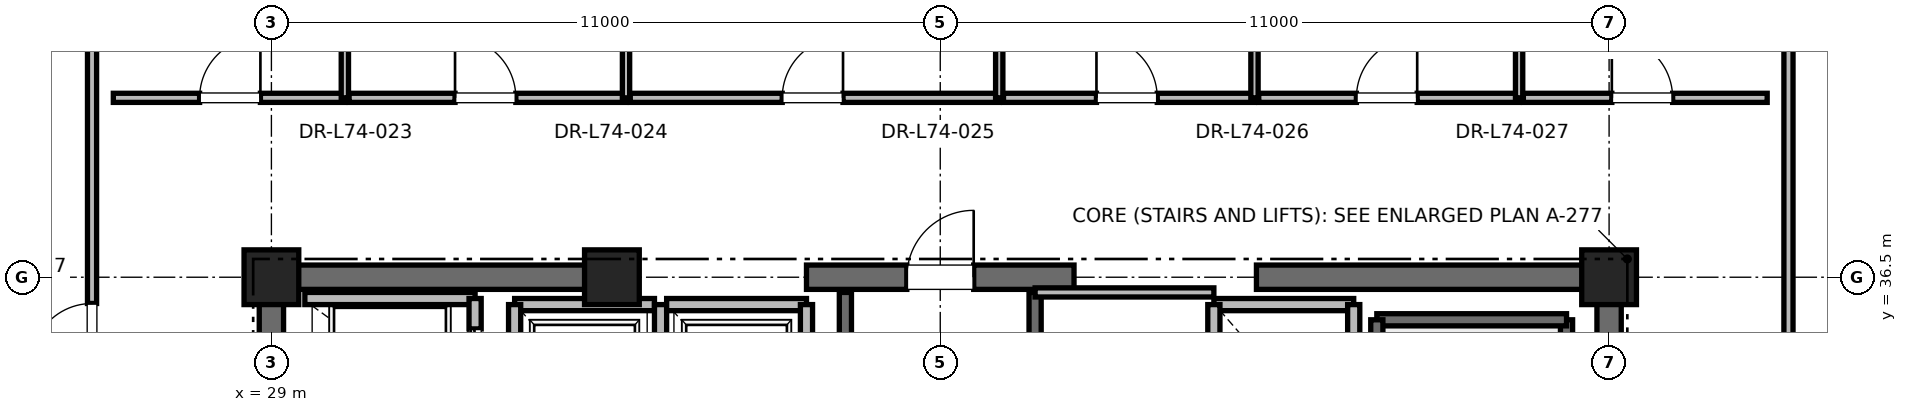
"""IFC4 building model, lengths in metres.
Left out: names, types, materials, properties, quantities, classifications, styles, units other than length and angle.
Written with IfcOpenShell. Run it as: python <this file> out.ifc"""

import sys

from ifc_helpers import new_model, si_unit, direction, frame, frame_2d, origin, origin_2d, place, context, subcontext, project, spatial, rectangle, extrude, element, fill, save


model = new_model("IFC4")
c1 = context("Model", 3, precision=1e-05, world=origin(), true_north=direction((0.0, 1.0)))
c2 = subcontext(c1, "Body", "Model", "MODEL_VIEW")
j1 = project(units=[si_unit("LENGTHUNIT", "METRE"), si_unit("PLANEANGLEUNIT", "RADIAN")], contexts=[c1])
p1 = place(None, origin())
s1 = spatial("IfcSite", under=j1, at=p1, CompositionType="ELEMENT")
p2 = place(p1, origin())
s2 = spatial("IfcBuilding", under=s1, at=p2, CompositionType="ELEMENT")
p3 = place(p2, frame((0.0, 0.0, 318.8)))
s3 = spatial("IfcBuildingStorey", under=s2, at=p3, CompositionType="ELEMENT", Elevation=318.8)
for number, where, z_axis, x_axis in (
    (1, (29.0, 36.5, 0.0), (0.0, 0.0, 1.0), (1.0, 0.0, 0.0)),
    (2, (51.0, 36.5, 0.0), (0.0, 0.0, 1.0), (1.0, 0.0, 0.0)),
    (3, (34.6, 36.5, 0.0), (0.0, 0.0, 1.0), (1.0, 0.0, 0.0)),
):
    element("IfcColumn", number, at=place(p3, frame(where, z_axis=z_axis, x_axis=x_axis)), inside=s3, PredefinedType="PILASTER", context=c2, shape_type="SweptSolid", body=[
        extrude(rectangle(XDim=0.9, YDim=0.9, at=origin_2d()), origin(), (0.0, 0.0, 1.0), 4.0),
    ])
p4 = place(p3, frame((29.0, 36.5, 0.0), z_axis=(0.0, 0.0, 1.0), x_axis=(1.0, 0.0, 0.0)))
e4 = element("IfcWall", 4, at=p4, inside=s3, PredefinedType="SHEAR", context=c2, shape_type="SweptSolid", body=[
    extrude(rectangle(XDim=5.8, YDim=0.4, at=frame_2d((2.9, 0.0))), origin(), (0.0, 0.0, 1.0), 3.785),
])
p5 = place(p3, frame((37.8, 36.5, 0.0), z_axis=(0.0, 0.0, 1.0), x_axis=(1.0, 0.0, 0.0)))
e5 = element("IfcWall", 5, at=p5, inside=s3, PredefinedType="SHEAR", context=c2, shape_type="SweptSolid", body=[
    extrude(rectangle(XDim=4.4, YDim=0.4, at=frame_2d((2.2, 0.0))), origin(), (0.0, 0.0, 1.0), 3.785),
])
p6 = place(p5, frame((1.65, 0.0, 0.0)))
e6 = element("IfcOpeningElement", 6, at=p6, cuts=e5, PredefinedType="OPENING", context=c2, shape_type="SweptSolid", body=[
    extrude(rectangle(XDim=1.1, YDim=2.15, at=frame_2d((0.55, 1.075))), frame((0.0, 0.2, 0.0), z_axis=(0.0, -1.0, 0.0), x_axis=(1.0, 0.0, 0.0)), (0.0, 0.0, 1.0), 0.4),
])
for number, where, z_axis, x_axis in (
    (7, (45.2, 36.5, 0.0), (0.0, 0.0, 1.0), (1.0, 0.0, 0.0)),
    (8, (29.0, 30.7, 0.0), (0.0, 0.0, 1.0), (0.0, 1.0, 0.0)),
):
    element("IfcWall", number, at=place(p3, frame(where, z_axis=z_axis, x_axis=x_axis)), inside=s3, PredefinedType="SHEAR", context=c2, shape_type="SweptSolid", body=[
        extrude(rectangle(XDim=5.8, YDim=0.4, at=frame_2d((2.9, 0.0))), origin(), (0.0, 0.0, 1.0), 3.785),
    ])
p7 = place(p3, frame((51.0, 27.7, 0.0), z_axis=(0.0, 0.0, 1.0), x_axis=(0.0, 1.0, 0.0)))
e9 = element("IfcWall", 9, at=p7, inside=s3, PredefinedType="SHEAR", context=c2, shape_type="SweptSolid", body=[
    extrude(rectangle(XDim=8.8, YDim=0.4, at=frame_2d((4.4, 0.0))), origin(), (0.0, 0.0, 1.0), 3.785),
])
p8 = place(p3, frame((50.3, 27.65, 0.0), z_axis=(0.0, 0.0, 1.0), x_axis=(0.0, 1.0, 0.0)))
e10 = element("IfcWall", 10, at=p8, inside=s3, PredefinedType="SOLIDWALL", context=c2, shape_type="SweptSolid", body=[
    extrude(rectangle(XDim=8.15, YDim=0.2, at=frame_2d((4.075, 0.0))), origin(), (0.0, 0.0, 1.0), 3.785),
])
p9 = place(p3, frame((47.18, 35.8, 0.0), z_axis=(0.0, 0.0, 1.0), x_axis=(1.0, 0.0, 0.0)))
e11 = element("IfcWall", 11, at=p9, inside=s3, PredefinedType="SOLIDWALL", context=c2, shape_type="SweptSolid", body=[
    extrude(rectangle(XDim=3.12, YDim=0.2, at=frame_2d((1.56, 0.0))), origin(), (0.0, 0.0, 1.0), 3.785),
])
p10 = place(p3, frame((47.18, 27.62, 0.0), z_axis=(0.0, 0.0, 1.0), x_axis=(0.0, 1.0, 0.0)))
e12 = element("IfcWall", 12, at=p10, inside=s3, PredefinedType="SOLIDWALL", context=c2, shape_type="SweptSolid", body=[
    extrude(rectangle(XDim=8.18, YDim=0.2, at=frame_2d((4.09, 0.0))), origin(), (0.0, 0.0, 1.0), 3.785),
])
p11 = place(p3, frame((38.44, 27.38, 0.0), z_axis=(0.0, 0.0, 1.0), x_axis=(0.0, 1.0, 0.0)))
e13 = element("IfcWall", 13, at=p11, inside=s3, PredefinedType="SOLIDWALL", context=c2, shape_type="SweptSolid", body=[
    extrude(rectangle(XDim=8.87, YDim=0.2, at=frame_2d((4.435, 0.0))), origin(), (0.0, 0.0, 1.0), 3.785),
])
p12 = place(p3, frame((41.56, 27.68, 0.0), z_axis=(0.0, 0.0, 1.0), x_axis=(0.0, 1.0, 0.0)))
e14 = element("IfcWall", 14, at=p12, inside=s3, PredefinedType="SOLIDWALL", context=c2, shape_type="SweptSolid", body=[
    extrude(rectangle(XDim=8.57, YDim=0.2, at=frame_2d((4.285, 0.0))), origin(), (0.0, 0.0, 1.0), 3.785),
])
p13 = place(p3, frame((32.35, 36.15, 0.0), z_axis=(0.0, 0.0, 1.0), x_axis=(-1.0, 0.0, 0.0)))
e15 = element("IfcWall", 15, at=p13, inside=s3, PredefinedType="SOLIDWALL", context=c2, shape_type="SweptSolid", body=[
    extrude(rectangle(XDim=2.8, YDim=0.2, at=frame_2d((1.4, 0.0))), origin(), (0.0, 0.0, 1.0), 3.22),
])
p14 = place(p3, frame((32.35, 34.05, 0.0), z_axis=(0.0, 0.0, 1.0), x_axis=(0.0, 1.0, 0.0)))
e16 = element("IfcWall", 16, at=p14, inside=s3, PredefinedType="SOLIDWALL", context=c2, shape_type="SweptSolid", body=[
    extrude(rectangle(XDim=2.1, YDim=0.2, at=frame_2d((1.05, 0.0))), origin(), (0.0, 0.0, 1.0), 3.785),
])
p15 = place(p14, frame((0.5, 0.0, 0.0)))
e17 = element("IfcOpeningElement", 17, at=p15, cuts=e16, PredefinedType="OPENING", context=c2, shape_type="SweptSolid", body=[
    extrude(rectangle(XDim=1.1, YDim=2.2, at=frame_2d((0.55, 1.1))), frame((0.0, 0.1, 0.0), z_axis=(0.0, -1.0, 0.0), x_axis=(1.0, 0.0, 0.0)), (0.0, 0.0, 1.0), 0.2),
])
p16 = place(p3, frame((35.3, 36.05, 0.0), z_axis=(0.0, 0.0, 1.0), x_axis=(-1.0, 0.0, 0.0)))
e18 = element("IfcWall", 18, at=p16, inside=s3, PredefinedType="SOLIDWALL", context=c2, shape_type="SweptSolid", body=[
    extrude(rectangle(XDim=2.3, YDim=0.2, at=frame_2d((1.15, 0.0))), origin(), (0.0, 0.0, 1.0), 2.865),
])
p17 = place(p3, frame((33.0, 36.05, 0.0), z_axis=(0.0, 0.0, 1.0), x_axis=(0.0, -1.0, 0.0)))
e19 = element("IfcWall", 19, at=p17, inside=s3, PredefinedType="SOLIDWALL", context=c2, shape_type="SweptSolid", body=[
    extrude(rectangle(XDim=2.6, YDim=0.2, at=frame_2d((1.3, 0.0))), origin(), (0.0, 0.0, 1.0), 3.785),
])
p18 = place(p3, frame((35.4, 33.45, 0.0), z_axis=(0.0, 0.0, 1.0), x_axis=(0.0, 1.0, 0.0)))
e20 = element("IfcWall", 20, at=p18, inside=s3, PredefinedType="SOLIDWALL", context=c2, shape_type="SweptSolid", body=[
    extrude(rectangle(XDim=2.6, YDim=0.2, at=frame_2d((1.3, 0.0))), origin(), (0.0, 0.0, 1.0), 2.865),
])
p19 = place(p3, frame((37.8, 36.05, 0.0), z_axis=(0.0, 0.0, 1.0), x_axis=(-1.0, 0.0, 0.0)))
e21 = element("IfcWall", 21, at=p19, inside=s3, PredefinedType="SOLIDWALL", context=c2, shape_type="SweptSolid", body=[
    extrude(rectangle(XDim=2.3, YDim=0.2, at=frame_2d((1.15, 0.0))), origin(), (0.0, 0.0, 1.0), 2.865),
])
p20 = place(p3, frame((37.8, 33.45, 0.0), z_axis=(0.0, 0.0, 1.0), x_axis=(0.0, 1.0, 0.0)))
e22 = element("IfcWall", 22, at=p20, inside=s3, PredefinedType="SOLIDWALL", context=c2, shape_type="SweptSolid", body=[
    extrude(rectangle(XDim=2.6, YDim=0.2, at=frame_2d((1.3, 0.0))), origin(), (0.0, 0.0, 1.0), 2.865),
])
p21 = place(p3, frame((46.8, 36.05, 0.0), z_axis=(0.0, 0.0, 1.0), x_axis=(-1.0, 0.0, 0.0)))
e23 = element("IfcWall", 23, at=p21, inside=s3, PredefinedType="SOLIDWALL", context=c2, shape_type="SweptSolid", body=[
    extrude(rectangle(XDim=2.3, YDim=0.2, at=frame_2d((1.15, 0.0))), origin(), (0.0, 0.0, 1.0), 2.865),
])
p22 = place(p3, frame((44.5, 36.05, 0.0), z_axis=(0.0, 0.0, 1.0), x_axis=(0.0, -1.0, 0.0)))
e24 = element("IfcWall", 24, at=p22, inside=s3, PredefinedType="SOLIDWALL", context=c2, shape_type="SweptSolid", body=[
    extrude(rectangle(XDim=2.6, YDim=0.2, at=frame_2d((1.3, 0.0))), origin(), (0.0, 0.0, 1.0), 2.865),
])
p23 = place(p3, frame((46.8, 33.45, 0.0), z_axis=(0.0, 0.0, 1.0), x_axis=(0.0, 1.0, 0.0)))
e25 = element("IfcWall", 25, at=p23, inside=s3, PredefinedType="SOLIDWALL", context=c2, shape_type="SweptSolid", body=[
    extrude(rectangle(XDim=2.6, YDim=0.2, at=frame_2d((1.3, 0.0))), origin(), (0.0, 0.0, 1.0), 3.785),
])
p24 = place(p3, frame((41.56, 36.25, 0.0), z_axis=(0.0, 0.0, 1.0), x_axis=(1.0, 0.0, 0.0)))
e26 = element("IfcWall", 26, at=p24, inside=s3, PredefinedType="PARTITIONING", context=c2, shape_type="SweptSolid", body=[
    extrude(rectangle(XDim=2.94, YDim=0.15, at=frame_2d((1.47, 0.0))), origin(), (0.0, 0.0, 1.0), 2.85),
])
p25 = place(p3, frame((26.4, 39.45, 0.0), z_axis=(0.0, 0.0, 1.0), x_axis=(1.0, 0.0, 0.0)))
e27 = element("IfcWall", 27, at=p25, inside=s3, PredefinedType="PARTITIONING", context=c2, shape_type="SweptSolid", body=[
    extrude(rectangle(XDim=3.808, YDim=0.15, at=frame_2d((1.904, 0.0))), origin(), (0.0, 0.0, 1.0), 2.85),
])
p26 = place(p25, frame((1.419, 0.0, 0.0)))
e28 = element("IfcOpeningElement", 28, at=p26, cuts=e27, PredefinedType="OPENING", context=c2, shape_type="SweptSolid", body=[
    extrude(rectangle(XDim=1.0, YDim=2.15, at=frame_2d((0.5, 1.075))), frame((0.0, 0.075, 0.0), z_axis=(0.0, -1.0, 0.0), x_axis=(1.0, 0.0, 0.0)), (0.0, 0.0, 1.0), 0.15),
])
p27 = place(p3, frame((30.208, 39.45, 0.0), z_axis=(0.0, 0.0, 1.0), x_axis=(0.0, 1.0, 0.0)))
e29 = element("IfcWall", 29, at=p27, inside=s3, PredefinedType="PARTITIONING", context=c2, shape_type="SweptSolid", body=[
    extrude(rectangle(XDim=9.566, YDim=0.12, at=frame_2d((4.783, 0.0))), origin(), (0.0, 0.0, 1.0), 2.415),
])
p28 = place(p3, frame((30.278, 39.45, 0.0), z_axis=(0.0, 0.0, 1.0), x_axis=(1.0, 0.0, 0.0)))
e30 = element("IfcWall", 30, at=p28, inside=s3, PredefinedType="PARTITIONING", context=c2, shape_type="SweptSolid", body=[
    extrude(rectangle(XDim=4.554, YDim=0.15, at=frame_2d((2.277, 0.0))), origin(), (0.0, 0.0, 1.0), 2.85),
])
p29 = place(p28, frame((1.742, 0.0, 0.0)))
e31 = element("IfcOpeningElement", 31, at=p29, cuts=e30, PredefinedType="OPENING", context=c2, shape_type="SweptSolid", body=[
    extrude(rectangle(XDim=1.0, YDim=2.15, at=frame_2d((0.5, 1.075))), frame((0.0, 0.075, 0.0), z_axis=(0.0, -1.0, 0.0), x_axis=(1.0, 0.0, 0.0)), (0.0, 0.0, 1.0), 0.15),
])
p30 = place(p3, frame((34.832, 39.45, 0.0), z_axis=(0.0, 0.0, 1.0), x_axis=(0.0, 1.0, 0.0)))
e32 = element("IfcWall", 32, at=p30, inside=s3, PredefinedType="PARTITIONING", context=c2, shape_type="SweptSolid", body=[
    extrude(rectangle(XDim=9.566, YDim=0.12, at=frame_2d((4.783, 0.0))), origin(), (0.0, 0.0, 1.0), 2.415),
])
p31 = place(p3, frame((34.902, 39.45, 0.0), z_axis=(0.0, 0.0, 1.0), x_axis=(1.0, 0.0, 0.0)))
e33 = element("IfcWall", 33, at=p31, inside=s3, PredefinedType="PARTITIONING", context=c2, shape_type="SweptSolid", body=[
    extrude(rectangle(XDim=6.068, YDim=0.15, at=frame_2d((3.034, 0.0))), origin(), (0.0, 0.0, 1.0), 2.85),
])
p32 = place(p31, frame((2.499, 0.0, 0.0)))
e34 = element("IfcOpeningElement", 34, at=p32, cuts=e33, PredefinedType="OPENING", context=c2, shape_type="SweptSolid", body=[
    extrude(rectangle(XDim=1.0, YDim=2.15, at=frame_2d((0.5, 1.075))), frame((0.0, 0.075, 0.0), z_axis=(0.0, -1.0, 0.0), x_axis=(1.0, 0.0, 0.0)), (0.0, 0.0, 1.0), 0.15),
])
p33 = place(p3, frame((40.97, 39.45, 0.0), z_axis=(0.0, 0.0, 1.0), x_axis=(0.0, 1.0, 0.0)))
e35 = element("IfcWall", 35, at=p33, inside=s3, PredefinedType="PARTITIONING", context=c2, shape_type="SweptSolid", body=[
    extrude(rectangle(XDim=9.566, YDim=0.12, at=frame_2d((4.783, 0.0))), origin(), (0.0, 0.0, 1.0), 2.415),
])
p34 = place(p3, frame((41.04, 39.45, 0.0), z_axis=(0.0, 0.0, 1.0), x_axis=(1.0, 0.0, 0.0)))
e36 = element("IfcWall", 36, at=p34, inside=s3, PredefinedType="PARTITIONING", context=c2, shape_type="SweptSolid", body=[
    extrude(rectangle(XDim=4.128, YDim=0.15, at=frame_2d((2.064, 0.0))), origin(), (0.0, 0.0, 1.0), 2.85),
])
p35 = place(p34, frame((1.529, 0.0, 0.0)))
e37 = element("IfcOpeningElement", 37, at=p35, cuts=e36, PredefinedType="OPENING", context=c2, shape_type="SweptSolid", body=[
    extrude(rectangle(XDim=1.0, YDim=2.15, at=frame_2d((0.5, 1.075))), frame((0.0, 0.075, 0.0), z_axis=(0.0, -1.0, 0.0), x_axis=(1.0, 0.0, 0.0)), (0.0, 0.0, 1.0), 0.15),
])
p36 = place(p3, frame((45.168, 39.45, 0.0), z_axis=(0.0, 0.0, 1.0), x_axis=(0.0, 1.0, 0.0)))
e38 = element("IfcWall", 38, at=p36, inside=s3, PredefinedType="PARTITIONING", context=c2, shape_type="SweptSolid", body=[
    extrude(rectangle(XDim=9.566, YDim=0.12, at=frame_2d((4.783, 0.0))), origin(), (0.0, 0.0, 1.0), 2.415),
])
p37 = place(p3, frame((45.238, 39.45, 0.0), z_axis=(0.0, 0.0, 1.0), x_axis=(1.0, 0.0, 0.0)))
e39 = element("IfcWall", 39, at=p37, inside=s3, PredefinedType="PARTITIONING", context=c2, shape_type="SweptSolid", body=[
    extrude(rectangle(XDim=4.282, YDim=0.15, at=frame_2d((2.141, 0.0))), origin(), (0.0, 0.0, 1.0), 2.85),
])
p38 = place(p37, frame((1.606, 0.0, 0.0)))
e40 = element("IfcOpeningElement", 40, at=p38, cuts=e39, PredefinedType="OPENING", context=c2, shape_type="SweptSolid", body=[
    extrude(rectangle(XDim=1.0, YDim=2.15, at=frame_2d((0.5, 1.075))), frame((0.0, 0.075, 0.0), z_axis=(0.0, -1.0, 0.0), x_axis=(1.0, 0.0, 0.0)), (0.0, 0.0, 1.0), 0.15),
])
p39 = place(p3, frame((49.52, 39.45, 0.0), z_axis=(0.0, 0.0, 1.0), x_axis=(0.0, 1.0, 0.0)))
e41 = element("IfcWall", 41, at=p39, inside=s3, PredefinedType="PARTITIONING", context=c2, shape_type="SweptSolid", body=[
    extrude(rectangle(XDim=9.566, YDim=0.12, at=frame_2d((4.783, 0.0))), origin(), (0.0, 0.0, 1.0), 2.415),
])
p40 = place(p3, frame((49.59, 39.45, 0.0), z_axis=(0.0, 0.0, 1.0), x_axis=(1.0, 0.0, 0.0)))
e42 = element("IfcWall", 42, at=p40, inside=s3, PredefinedType="PARTITIONING", context=c2, shape_type="SweptSolid", body=[
    extrude(rectangle(XDim=4.01, YDim=0.15, at=frame_2d((2.005, 0.0))), origin(), (0.0, 0.0, 1.0), 2.85),
])
p41 = place(p40, frame((1.455, 0.0, 0.0)))
e43 = element("IfcOpeningElement", 43, at=p41, cuts=e42, PredefinedType="OPENING", context=c2, shape_type="SweptSolid", body=[
    extrude(rectangle(XDim=1.0, YDim=2.15, at=frame_2d((0.5, 1.075))), frame((0.0, 0.075, 0.0), z_axis=(0.0, -1.0, 0.0), x_axis=(1.0, 0.0, 0.0)), (0.0, 0.0, 1.0), 0.15),
])
p42 = place(p3, frame((26.05, 34.736, 0.0), z_axis=(0.0, 0.0, 1.0), x_axis=(0.0, 1.0, 0.0)))
e44 = element("IfcWall", 44, at=p42, inside=s3, PredefinedType="PARTITIONING", context=c2, shape_type="SweptSolid", body=[
    extrude(rectangle(XDim=10.679, YDim=0.15, at=frame_2d((5.34, 0.0))), origin(), (0.0, 0.0, 1.0), 2.85),
])
p43 = place(p42, frame((0.332, 0.0, 0.0)))
e45 = element("IfcOpeningElement", 45, at=p43, cuts=e44, PredefinedType="OPENING", context=c2, shape_type="SweptSolid", body=[
    extrude(rectangle(XDim=1.0, YDim=2.15, at=frame_2d((0.5, 1.075))), frame((0.0, 0.075, 0.0), z_axis=(0.0, -1.0, 0.0), x_axis=(1.0, 0.0, 0.0)), (0.0, 0.0, 1.0), 0.15),
])
p44 = place(p3, frame((53.95, 24.704, 0.0), z_axis=(0.0, 0.0, 1.0), x_axis=(0.0, 1.0, 0.0)))
e46 = element("IfcWall", 46, at=p44, inside=s3, PredefinedType="PARTITIONING", context=c2, shape_type="SweptSolid", body=[
    extrude(rectangle(XDim=20.712, YDim=0.15, at=frame_2d((10.356, 0.0))), origin(), (0.0, 0.0, 1.0), 2.85),
])
p45 = place(p44, frame((5.348, 0.0, 0.0)))
e47 = element("IfcOpeningElement", 47, at=p45, cuts=e46, PredefinedType="OPENING", context=c2, shape_type="SweptSolid", body=[
    extrude(rectangle(XDim=1.0, YDim=2.15, at=frame_2d((0.5, 1.075))), frame((0.0, 0.075, 0.0), z_axis=(0.0, -1.0, 0.0), x_axis=(1.0, 0.0, 0.0)), (0.0, 0.0, 1.0), 0.15),
])
p46 = place(p6, origin())
e48 = element("IfcDoor", 48, at=p46, inside=s3, OperationType="SINGLE_SWING_RIGHT", PredefinedType="DOOR", context=c2, shape_type="SweptSolid", body=[
    extrude(rectangle(XDim=1.1, YDim=2.15, at=frame_2d((0.55, 1.075))), frame((0.0, 0.025, 0.0), z_axis=(0.0, -1.0, 0.0), x_axis=(1.0, 0.0, 0.0)), (0.0, 0.0, 1.0), 0.05),
])
fill(e6, e48)
p47 = place(p15, origin())
e49 = element("IfcDoor", 49, at=p47, inside=s3, OperationType="SLIDING_TO_RIGHT", PredefinedType="DOOR", context=c2, shape_type="SweptSolid", body=[
    extrude(rectangle(XDim=1.1, YDim=2.2, at=frame_2d((0.55, 1.1))), frame((0.0, 0.025, 0.0), z_axis=(0.0, -1.0, 0.0), x_axis=(1.0, 0.0, 0.0)), (0.0, 0.0, 1.0), 0.05),
])
fill(e17, e49)
p48 = place(p26, origin())
e50 = element("IfcDoor", 50, at=p48, inside=s3, OperationType="SINGLE_SWING_RIGHT", PredefinedType="DOOR", context=c2, shape_type="SweptSolid", body=[
    extrude(rectangle(XDim=1.0, YDim=2.15, at=frame_2d((0.5, 1.075))), frame((0.0, 0.025, 0.0), z_axis=(0.0, -1.0, 0.0), x_axis=(1.0, 0.0, 0.0)), (0.0, 0.0, 1.0), 0.05),
])
fill(e28, e50)
p49 = place(p29, origin())
e51 = element("IfcDoor", 51, at=p49, inside=s3, OperationType="SINGLE_SWING_LEFT", PredefinedType="DOOR", context=c2, shape_type="SweptSolid", body=[
    extrude(rectangle(XDim=1.0, YDim=2.15, at=frame_2d((0.5, 1.075))), frame((0.0, 0.025, 0.0), z_axis=(0.0, -1.0, 0.0), x_axis=(1.0, 0.0, 0.0)), (0.0, 0.0, 1.0), 0.05),
])
fill(e31, e51)
p50 = place(p32, origin())
e52 = element("IfcDoor", 52, at=p50, inside=s3, OperationType="SINGLE_SWING_RIGHT", PredefinedType="DOOR", context=c2, shape_type="SweptSolid", body=[
    extrude(rectangle(XDim=1.0, YDim=2.15, at=frame_2d((0.5, 1.075))), frame((0.0, 0.025, 0.0), z_axis=(0.0, -1.0, 0.0), x_axis=(1.0, 0.0, 0.0)), (0.0, 0.0, 1.0), 0.05),
])
fill(e34, e52)
p51 = place(p35, origin())
e53 = element("IfcDoor", 53, at=p51, inside=s3, OperationType="SINGLE_SWING_LEFT", PredefinedType="DOOR", context=c2, shape_type="SweptSolid", body=[
    extrude(rectangle(XDim=1.0, YDim=2.15, at=frame_2d((0.5, 1.075))), frame((0.0, 0.025, 0.0), z_axis=(0.0, -1.0, 0.0), x_axis=(1.0, 0.0, 0.0)), (0.0, 0.0, 1.0), 0.05),
])
fill(e37, e53)
p52 = place(p38, origin())
e54 = element("IfcDoor", 54, at=p52, inside=s3, OperationType="SINGLE_SWING_RIGHT", PredefinedType="DOOR", context=c2, shape_type="SweptSolid", body=[
    extrude(rectangle(XDim=1.0, YDim=2.15, at=frame_2d((0.5, 1.075))), frame((0.0, 0.025, 0.0), z_axis=(0.0, -1.0, 0.0), x_axis=(1.0, 0.0, 0.0)), (0.0, 0.0, 1.0), 0.05),
])
fill(e40, e54)
p53 = place(p41, origin())
e55 = element("IfcDoor", 55, at=p53, inside=s3, OperationType="SINGLE_SWING_LEFT", PredefinedType="DOOR", context=c2, shape_type="SweptSolid", body=[
    extrude(rectangle(XDim=1.0, YDim=2.15, at=frame_2d((0.5, 1.075))), frame((0.0, 0.025, 0.0), z_axis=(0.0, -1.0, 0.0), x_axis=(1.0, 0.0, 0.0)), (0.0, 0.0, 1.0), 0.05),
])
fill(e43, e55)
p54 = place(p43, origin())
e56 = element("IfcDoor", 56, at=p54, inside=s3, OperationType="SINGLE_SWING_LEFT", PredefinedType="DOOR", context=c2, shape_type="SweptSolid", body=[
    extrude(rectangle(XDim=1.0, YDim=2.15, at=frame_2d((0.5, 1.075))), frame((0.0, 0.025, 0.0), z_axis=(0.0, -1.0, 0.0), x_axis=(1.0, 0.0, 0.0)), (0.0, 0.0, 1.0), 0.05),
])
fill(e45, e56)
save(model, sys.argv[1])
